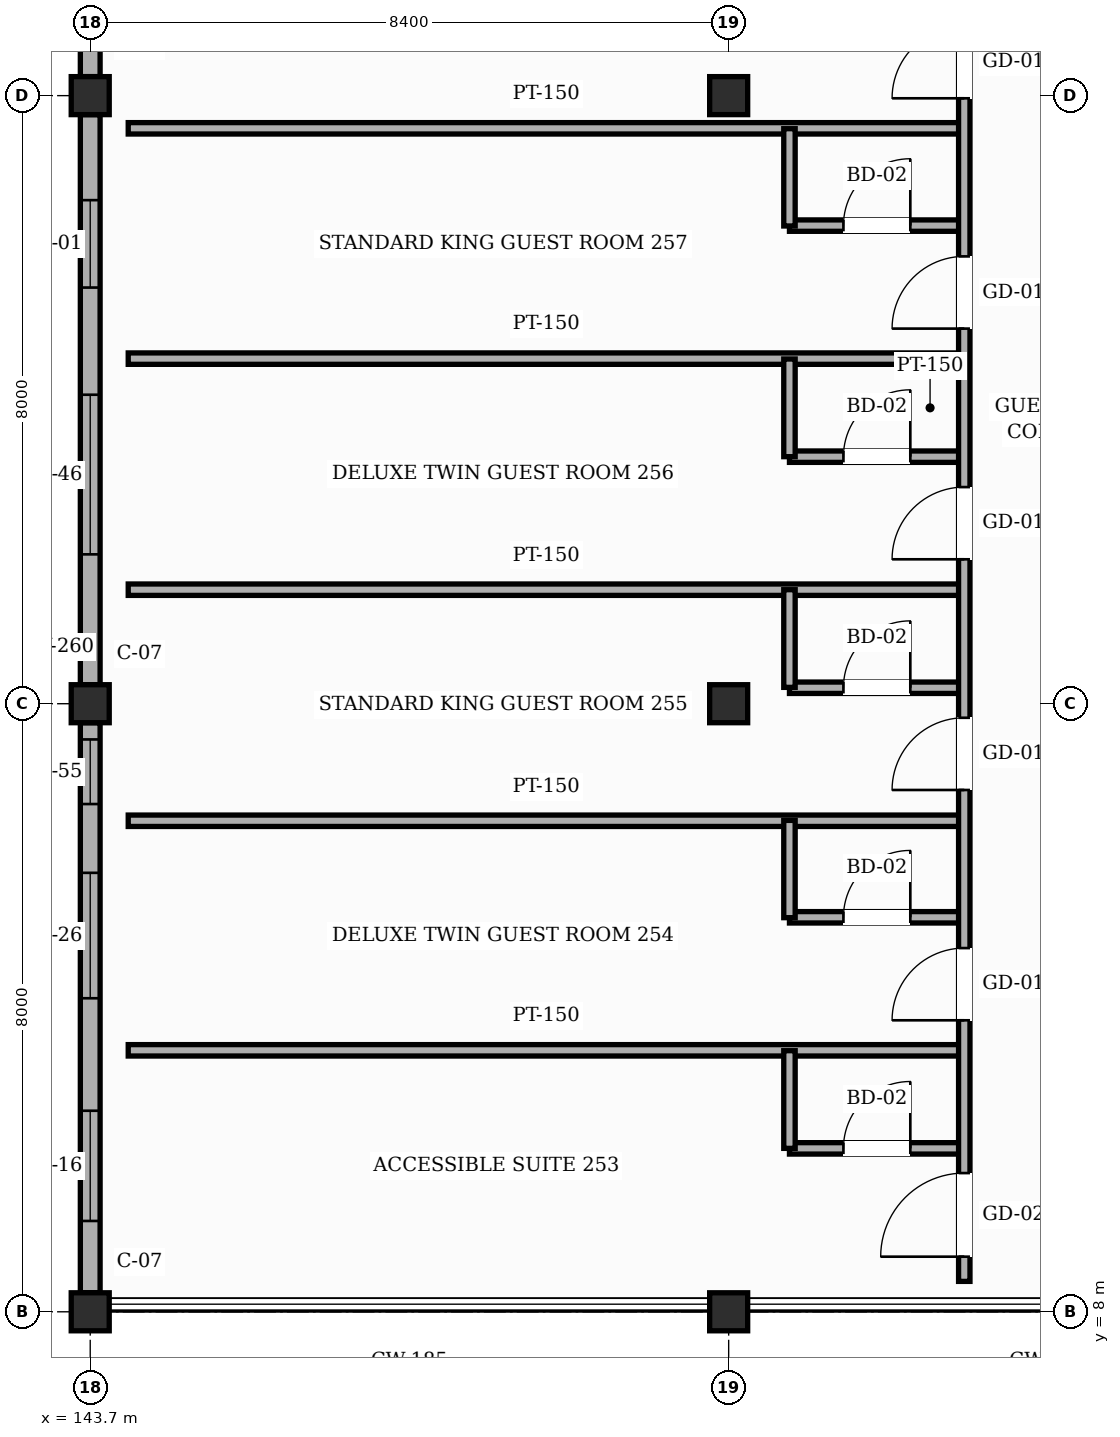
"""IFC4 building model, lengths in metres.
Left out: names, types, materials, properties, quantities, classifications, styles, units other than length and angle.
Written with IfcOpenShell. Run it as: python <this file> out.ifc"""

import sys

from ifc_helpers import new_model, si_unit, direction, frame, frame_2d, origin, origin_2d, place, context, subcontext, project, spatial, rectangle, hollow_rectangle, extrude, element, fill, save


model = new_model("IFC4")
c1 = context("Model", 3, precision=1e-05, world=origin(), true_north=direction((0.0, 1.0)))
c2 = subcontext(c1, "Body", "Model", "MODEL_VIEW")
j1 = project(units=[si_unit("LENGTHUNIT", "METRE"), si_unit("PLANEANGLEUNIT", "RADIAN")], contexts=[c1])
p1 = place(None, origin())
s1 = spatial("IfcSite", under=j1, at=p1, CompositionType="ELEMENT")
p2 = place(p1, origin())
s2 = spatial("IfcBuilding", under=s1, at=p2, CompositionType="ELEMENT")
p3 = place(p2, frame((0.0, 0.0, 39.0)))
s3 = spatial("IfcBuildingStorey", under=s2, at=p3, CompositionType="ELEMENT", Elevation=39.0)
p4 = place(p3, frame((143.7, 8.0, 0.0), z_axis=(0.0, 0.0, 1.0), x_axis=(1.0, 0.0, 0.0)))
e1 = element("IfcColumn", 1, at=p4, inside=s3, PredefinedType="COLUMN", context=c2, shape_type="SweptSolid", body=[
    extrude(hollow_rectangle(XDim=0.5, YDim=0.5, WallThickness=0.022, InnerFilletRadius=0.022, OuterFilletRadius=0.044, at=origin_2d()), origin(), (0.0, 0.0, 1.0), 3.38),
])
for number, where, z_axis, x_axis in (
    (2, (143.7, 16.0, 0.0), (0.0, 0.0, 1.0), (1.0, 0.0, 0.0)),
    (3, (143.7, 24.0, 0.0), (0.0, 0.0, 1.0), (1.0, 0.0, 0.0)),
):
    element("IfcColumn", number, at=place(p3, frame(where, z_axis=z_axis, x_axis=x_axis)), inside=s3, PredefinedType="COLUMN", context=c2, shape_type="SweptSolid", body=[
        extrude(hollow_rectangle(XDim=0.5, YDim=0.5, WallThickness=0.022, InnerFilletRadius=0.022, OuterFilletRadius=0.044, at=origin_2d()), origin(), (0.0, 0.0, 1.0), 3.6),
    ])
p5 = place(p3, frame((152.1, 8.0, 0.0), z_axis=(0.0, 0.0, 1.0), x_axis=(1.0, 0.0, 0.0)))
e4 = element("IfcColumn", 4, at=p5, inside=s3, PredefinedType="COLUMN", context=c2, shape_type="SweptSolid", body=[
    extrude(hollow_rectangle(XDim=0.5, YDim=0.5, WallThickness=0.022, InnerFilletRadius=0.022, OuterFilletRadius=0.044, at=origin_2d()), origin(), (0.0, 0.0, 1.0), 3.38),
])
for number, where, z_axis, x_axis in (
    (5, (152.1, 16.0, 0.0), (0.0, 0.0, 1.0), (1.0, 0.0, 0.0)),
    (6, (152.1, 24.0, 0.0), (0.0, 0.0, 1.0), (1.0, 0.0, 0.0)),
):
    element("IfcColumn", number, at=place(p3, frame(where, z_axis=z_axis, x_axis=x_axis)), inside=s3, PredefinedType="COLUMN", context=c2, shape_type="SweptSolid", body=[
        extrude(hollow_rectangle(XDim=0.5, YDim=0.5, WallThickness=0.022, InnerFilletRadius=0.022, OuterFilletRadius=0.044, at=origin_2d()), origin(), (0.0, 0.0, 1.0), 3.6),
    ])
p6 = place(p3, frame((143.7, 8.25, 0.0), z_axis=(0.0, 0.0, 1.0), x_axis=(0.0, 1.0, 0.0)))
e7 = element("IfcWall", 7, at=p6, inside=s3, PredefinedType="SOLIDWALL", context=c2, shape_type="SweptSolid", body=[
    extrude(rectangle(XDim=7.5, YDim=0.26, at=frame_2d((3.75, 0.0))), origin(), (0.0, 0.0, 1.0), 2.805),
])
p7 = place(p6, frame((0.945, 0.0, 0.85)))
e8 = element("IfcOpeningElement", 8, at=p7, cuts=e7, PredefinedType="OPENING", context=c2, shape_type="SweptSolid", body=[
    extrude(rectangle(XDim=1.45, YDim=1.35, at=frame_2d((0.725, 0.675))), frame((0.0, 0.14, 0.0), z_axis=(0.0, -1.0, 0.0), x_axis=(1.0, 0.0, 0.0)), (0.0, 0.0, 1.0), 0.28),
])
p8 = place(p6, frame((3.875, 0.0, 0.85)))
e9 = element("IfcOpeningElement", 9, at=p8, cuts=e7, PredefinedType="OPENING", context=c2, shape_type="SweptSolid", body=[
    extrude(rectangle(XDim=1.65, YDim=1.35, at=frame_2d((0.825, 0.675))), frame((0.0, 0.14, 0.0), z_axis=(0.0, -1.0, 0.0), x_axis=(1.0, 0.0, 0.0)), (0.0, 0.0, 1.0), 0.28),
])
p9 = place(p6, frame((6.43, 0.0, 0.85)))
e10 = element("IfcOpeningElement", 10, at=p9, cuts=e7, PredefinedType="OPENING", context=c2, shape_type="SweptSolid", body=[
    extrude(rectangle(XDim=0.85, YDim=1.35, at=frame_2d((0.425, 0.675))), frame((0.0, 0.14, 0.0), z_axis=(0.0, -1.0, 0.0), x_axis=(1.0, 0.0, 0.0)), (0.0, 0.0, 1.0), 0.28),
])
p10 = place(p3, frame((143.7, 16.25, 0.0), z_axis=(0.0, 0.0, 1.0), x_axis=(0.0, 1.0, 0.0)))
e11 = element("IfcWall", 11, at=p10, inside=s3, PredefinedType="SOLIDWALL", context=c2, shape_type="SweptSolid", body=[
    extrude(rectangle(XDim=7.5, YDim=0.26, at=frame_2d((3.75, 0.0))), origin(), (0.0, 0.0, 1.0), 2.805),
])
p11 = place(p10, frame((1.715, 0.0, 0.85)))
e12 = element("IfcOpeningElement", 12, at=p11, cuts=e11, PredefinedType="OPENING", context=c2, shape_type="SweptSolid", body=[
    extrude(rectangle(XDim=2.1, YDim=1.35, at=frame_2d((1.05, 0.675))), frame((0.0, 0.14, 0.0), z_axis=(0.0, -1.0, 0.0), x_axis=(1.0, 0.0, 0.0)), (0.0, 0.0, 1.0), 0.28),
])
p12 = place(p10, frame((5.225, 0.0, 0.85)))
e13 = element("IfcOpeningElement", 13, at=p12, cuts=e11, PredefinedType="OPENING", context=c2, shape_type="SweptSolid", body=[
    extrude(rectangle(XDim=1.15, YDim=1.35, at=frame_2d((0.575, 0.675))), frame((0.0, 0.14, 0.0), z_axis=(0.0, -1.0, 0.0), x_axis=(1.0, 0.0, 0.0)), (0.0, 0.0, 1.0), 0.28),
])
p13 = place(p3, frame((143.7, 24.25, 0.0), z_axis=(0.0, 0.0, 1.0), x_axis=(0.0, 1.0, 0.0)))
e14 = element("IfcWall", 14, at=p13, inside=s3, PredefinedType="SOLIDWALL", context=c2, shape_type="SweptSolid", body=[
    extrude(rectangle(XDim=2.35, YDim=0.26, at=frame_2d((1.175, 0.0))), origin(), (0.0, 0.0, 1.0), 2.805),
])
p14 = place(p13, frame((0.5, 0.0, 0.85)))
e15 = element("IfcOpeningElement", 15, at=p14, cuts=e14, PredefinedType="OPENING", context=c2, shape_type="SweptSolid", body=[
    extrude(rectangle(XDim=1.35, YDim=1.35, at=frame_2d((0.675, 0.675))), frame((0.0, 0.14, 0.0), z_axis=(0.0, -1.0, 0.0), x_axis=(1.0, 0.0, 0.0)), (0.0, 0.0, 1.0), 0.28),
])
p15 = place(p3, frame((152.9, 10.15, 0.0), z_axis=(0.0, 0.0, 1.0), x_axis=(1.0, 0.0, 0.0)))
e16 = element("IfcWall", 16, at=p15, inside=s3, PredefinedType="PARTITIONING", context=c2, shape_type="SweptSolid", body=[
    extrude(rectangle(XDim=2.3, YDim=0.15, at=frame_2d((1.15, 0.0))), origin(), (0.0, 0.0, 1.0), 3.365),
])
p16 = place(p15, frame((0.71, 0.0, 0.0)))
e17 = element("IfcOpeningElement", 17, at=p16, cuts=e16, PredefinedType="OPENING", context=c2, shape_type="SweptSolid", body=[
    extrude(rectangle(XDim=0.88, YDim=2.12, at=frame_2d((0.44, 1.06))), frame((0.0, 0.085, 0.0), z_axis=(0.0, -1.0, 0.0), x_axis=(1.0, 0.0, 0.0)), (0.0, 0.0, 1.0), 0.17),
])
p17 = place(p3, frame((144.2, 11.44, 0.0), z_axis=(0.0, 0.0, 1.0), x_axis=(1.0, 0.0, 0.0)))
e18 = element("IfcWall", 18, at=p17, inside=s3, PredefinedType="PARTITIONING", context=c2, shape_type="SweptSolid", body=[
    extrude(rectangle(XDim=11.0, YDim=0.15, at=frame_2d((5.5, 0.0))), origin(), (0.0, 0.0, 1.0), 3.365),
])
p18 = place(p3, frame((152.9, 13.19, 0.0), z_axis=(0.0, 0.0, 1.0), x_axis=(1.0, 0.0, 0.0)))
e19 = element("IfcWall", 19, at=p18, inside=s3, PredefinedType="PARTITIONING", context=c2, shape_type="SweptSolid", body=[
    extrude(rectangle(XDim=2.3, YDim=0.15, at=frame_2d((1.15, 0.0))), origin(), (0.0, 0.0, 1.0), 3.365),
])
p19 = place(p18, frame((0.71, 0.0, 0.0)))
e20 = element("IfcOpeningElement", 20, at=p19, cuts=e19, PredefinedType="OPENING", context=c2, shape_type="SweptSolid", body=[
    extrude(rectangle(XDim=0.88, YDim=2.12, at=frame_2d((0.44, 1.06))), frame((0.0, 0.085, 0.0), z_axis=(0.0, -1.0, 0.0), x_axis=(1.0, 0.0, 0.0)), (0.0, 0.0, 1.0), 0.17),
])
p20 = place(p3, frame((144.2, 14.46, 0.0), z_axis=(0.0, 0.0, 1.0), x_axis=(1.0, 0.0, 0.0)))
e21 = element("IfcWall", 21, at=p20, inside=s3, PredefinedType="PARTITIONING", context=c2, shape_type="SweptSolid", body=[
    extrude(rectangle(XDim=11.0, YDim=0.15, at=frame_2d((5.5, 0.0))), origin(), (0.0, 0.0, 1.0), 3.365),
])
p21 = place(p3, frame((152.9, 16.21, 0.0), z_axis=(0.0, 0.0, 1.0), x_axis=(1.0, 0.0, 0.0)))
e22 = element("IfcWall", 22, at=p21, inside=s3, PredefinedType="PARTITIONING", context=c2, shape_type="SweptSolid", body=[
    extrude(rectangle(XDim=2.3, YDim=0.15, at=frame_2d((1.15, 0.0))), origin(), (0.0, 0.0, 1.0), 2.755),
])
p22 = place(p21, frame((0.71, 0.0, 0.0)))
e23 = element("IfcOpeningElement", 23, at=p22, cuts=e22, PredefinedType="OPENING", context=c2, shape_type="SweptSolid", body=[
    extrude(rectangle(XDim=0.88, YDim=2.12, at=frame_2d((0.44, 1.06))), frame((0.0, 0.085, 0.0), z_axis=(0.0, -1.0, 0.0), x_axis=(1.0, 0.0, 0.0)), (0.0, 0.0, 1.0), 0.17),
])
p23 = place(p3, frame((144.2, 17.5, 0.0), z_axis=(0.0, 0.0, 1.0), x_axis=(1.0, 0.0, 0.0)))
e24 = element("IfcWall", 24, at=p23, inside=s3, PredefinedType="PARTITIONING", context=c2, shape_type="SweptSolid", body=[
    extrude(rectangle(XDim=11.0, YDim=0.15, at=frame_2d((5.5, 0.0))), origin(), (0.0, 0.0, 1.0), 3.365),
])
p24 = place(p3, frame((152.9, 19.25, 0.0), z_axis=(0.0, 0.0, 1.0), x_axis=(1.0, 0.0, 0.0)))
e25 = element("IfcWall", 25, at=p24, inside=s3, PredefinedType="PARTITIONING", context=c2, shape_type="SweptSolid", body=[
    extrude(rectangle(XDim=2.3, YDim=0.15, at=frame_2d((1.15, 0.0))), origin(), (0.0, 0.0, 1.0), 3.365),
])
p25 = place(p24, frame((0.71, 0.0, 0.0)))
e26 = element("IfcOpeningElement", 26, at=p25, cuts=e25, PredefinedType="OPENING", context=c2, shape_type="SweptSolid", body=[
    extrude(rectangle(XDim=0.88, YDim=2.12, at=frame_2d((0.44, 1.06))), frame((0.0, 0.085, 0.0), z_axis=(0.0, -1.0, 0.0), x_axis=(1.0, 0.0, 0.0)), (0.0, 0.0, 1.0), 0.17),
])
p26 = place(p3, frame((144.2, 20.54, 0.0), z_axis=(0.0, 0.0, 1.0), x_axis=(1.0, 0.0, 0.0)))
e27 = element("IfcWall", 27, at=p26, inside=s3, PredefinedType="PARTITIONING", context=c2, shape_type="SweptSolid", body=[
    extrude(rectangle(XDim=11.0, YDim=0.15, at=frame_2d((5.5, 0.0))), origin(), (0.0, 0.0, 1.0), 3.365),
])
p27 = place(p3, frame((152.9, 22.29, 0.0), z_axis=(0.0, 0.0, 1.0), x_axis=(1.0, 0.0, 0.0)))
e28 = element("IfcWall", 28, at=p27, inside=s3, PredefinedType="PARTITIONING", context=c2, shape_type="SweptSolid", body=[
    extrude(rectangle(XDim=2.3, YDim=0.15, at=frame_2d((1.15, 0.0))), origin(), (0.0, 0.0, 1.0), 3.365),
])
p28 = place(p27, frame((0.71, 0.0, 0.0)))
e29 = element("IfcOpeningElement", 29, at=p28, cuts=e28, PredefinedType="OPENING", context=c2, shape_type="SweptSolid", body=[
    extrude(rectangle(XDim=0.88, YDim=2.12, at=frame_2d((0.44, 1.06))), frame((0.0, 0.085, 0.0), z_axis=(0.0, -1.0, 0.0), x_axis=(1.0, 0.0, 0.0)), (0.0, 0.0, 1.0), 0.17),
])
p29 = place(p3, frame((144.2, 23.57, 0.0), z_axis=(0.0, 0.0, 1.0), x_axis=(1.0, 0.0, 0.0)))
e30 = element("IfcWall", 30, at=p29, inside=s3, PredefinedType="PARTITIONING", context=c2, shape_type="SweptSolid", body=[
    extrude(rectangle(XDim=11.0, YDim=0.15, at=frame_2d((5.5, 0.0))), origin(), (0.0, 0.0, 1.0), 3.365),
])
p30 = place(p3, frame((152.9, 10.15, 0.0), z_axis=(0.0, 0.0, 1.0), x_axis=(0.0, 1.0, 0.0)))
e31 = element("IfcWall", 31, at=p30, inside=s3, PredefinedType="PARTITIONING", context=c2, shape_type="SweptSolid", body=[
    extrude(rectangle(XDim=1.285, YDim=0.15, at=frame_2d((0.643, 0.0))), origin(), (0.0, 0.0, 1.0), 3.365),
])
p31 = place(p3, frame((152.9, 13.185, 0.0), z_axis=(0.0, 0.0, 1.0), x_axis=(0.0, 1.0, 0.0)))
e32 = element("IfcWall", 32, at=p31, inside=s3, PredefinedType="PARTITIONING", context=c2, shape_type="SweptSolid", body=[
    extrude(rectangle(XDim=1.28, YDim=0.15, at=frame_2d((0.64, 0.0))), origin(), (0.0, 0.0, 1.0), 3.365),
])
for number, where, z_axis, x_axis in (
    (33, (152.9, 16.215, 0.0), (0.0, 0.0, 1.0), (0.0, 1.0, 0.0)),
    (34, (152.9, 19.25, 0.0), (0.0, 0.0, 1.0), (0.0, 1.0, 0.0)),
):
    element("IfcWall", number, at=place(p3, frame(where, z_axis=z_axis, x_axis=x_axis)), inside=s3, PredefinedType="PARTITIONING", context=c2, shape_type="SweptSolid", body=[
        extrude(rectangle(XDim=1.285, YDim=0.15, at=frame_2d((0.643, 0.0))), origin(), (0.0, 0.0, 1.0), 3.365),
    ])
p32 = place(p3, frame((152.9, 22.285, 0.0), z_axis=(0.0, 0.0, 1.0), x_axis=(0.0, 1.0, 0.0)))
e35 = element("IfcWall", 35, at=p32, inside=s3, PredefinedType="PARTITIONING", context=c2, shape_type="SweptSolid", body=[
    extrude(rectangle(XDim=1.28, YDim=0.15, at=frame_2d((0.64, 0.0))), origin(), (0.0, 0.0, 1.0), 3.365),
])
p33 = place(p3, frame((155.2, 8.4, 0.0), z_axis=(0.0, 0.0, 1.0), x_axis=(0.0, 1.0, 0.0)))
e36 = element("IfcWall", 36, at=p33, inside=s3, PredefinedType="PARTITIONING", context=c2, shape_type="SweptSolid", body=[
    extrude(rectangle(XDim=18.2, YDim=0.15, at=frame_2d((9.1, 0.0))), origin(), (0.0, 0.0, 1.0), 3.365),
])
p34 = place(p33, frame((0.325, 0.0, 0.0)))
e37 = element("IfcOpeningElement", 37, at=p34, cuts=e36, PredefinedType="OPENING", context=c2, shape_type="SweptSolid", body=[
    extrude(rectangle(XDim=1.1, YDim=2.2, at=frame_2d((0.55, 1.1))), frame((0.0, 0.085, 0.0), z_axis=(0.0, -1.0, 0.0), x_axis=(1.0, 0.0, 0.0)), (0.0, 0.0, 1.0), 0.17),
])
p35 = place(p33, frame((3.435, 0.0, 0.0)))
e38 = element("IfcOpeningElement", 38, at=p35, cuts=e36, PredefinedType="OPENING", context=c2, shape_type="SweptSolid", body=[
    extrude(rectangle(XDim=0.95, YDim=2.15, at=frame_2d((0.475, 1.075))), frame((0.0, 0.085, 0.0), z_axis=(0.0, -1.0, 0.0), x_axis=(1.0, 0.0, 0.0)), (0.0, 0.0, 1.0), 0.17),
])
p36 = place(p33, frame((6.465, 0.0, 0.0)))
e39 = element("IfcOpeningElement", 39, at=p36, cuts=e36, PredefinedType="OPENING", context=c2, shape_type="SweptSolid", body=[
    extrude(rectangle(XDim=0.95, YDim=2.15, at=frame_2d((0.475, 1.075))), frame((0.0, 0.085, 0.0), z_axis=(0.0, -1.0, 0.0), x_axis=(1.0, 0.0, 0.0)), (0.0, 0.0, 1.0), 0.17),
])
p37 = place(p33, frame((9.5, 0.0, 0.0)))
e40 = element("IfcOpeningElement", 40, at=p37, cuts=e36, PredefinedType="OPENING", context=c2, shape_type="SweptSolid", body=[
    extrude(rectangle(XDim=0.95, YDim=2.15, at=frame_2d((0.475, 1.075))), frame((0.0, 0.085, 0.0), z_axis=(0.0, -1.0, 0.0), x_axis=(1.0, 0.0, 0.0)), (0.0, 0.0, 1.0), 0.17),
])
p38 = place(p33, frame((12.535, 0.0, 0.0)))
e41 = element("IfcOpeningElement", 41, at=p38, cuts=e36, PredefinedType="OPENING", context=c2, shape_type="SweptSolid", body=[
    extrude(rectangle(XDim=0.95, YDim=2.15, at=frame_2d((0.475, 1.075))), frame((0.0, 0.085, 0.0), z_axis=(0.0, -1.0, 0.0), x_axis=(1.0, 0.0, 0.0)), (0.0, 0.0, 1.0), 0.17),
])
p39 = place(p33, frame((15.565, 0.0, 0.0)))
e42 = element("IfcOpeningElement", 42, at=p39, cuts=e36, PredefinedType="OPENING", context=c2, shape_type="SweptSolid", body=[
    extrude(rectangle(XDim=0.95, YDim=2.15, at=frame_2d((0.475, 1.075))), frame((0.0, 0.085, 0.0), z_axis=(0.0, -1.0, 0.0), x_axis=(1.0, 0.0, 0.0)), (0.0, 0.0, 1.0), 0.17),
])
p40 = place(p7, origin())
e43 = element("IfcWindow", 43, at=p40, inside=s3, PartitioningType="SINGLE_PANEL", PredefinedType="WINDOW", context=c2, shape_type="SweptSolid", body=[
    extrude(rectangle(XDim=1.45, YDim=1.35, at=frame_2d((0.725, 0.675))), frame((0.0, 0.03, 0.0), z_axis=(0.0, -1.0, 0.0), x_axis=(1.0, 0.0, 0.0)), (0.0, 0.0, 1.0), 0.06),
])
fill(e8, e43)
p41 = place(p8, origin())
e44 = element("IfcWindow", 44, at=p41, inside=s3, PartitioningType="SINGLE_PANEL", PredefinedType="WINDOW", context=c2, shape_type="SweptSolid", body=[
    extrude(rectangle(XDim=1.65, YDim=1.35, at=frame_2d((0.825, 0.675))), frame((0.0, 0.03, 0.0), z_axis=(0.0, -1.0, 0.0), x_axis=(1.0, 0.0, 0.0)), (0.0, 0.0, 1.0), 0.06),
])
fill(e9, e44)
p42 = place(p9, origin())
e45 = element("IfcWindow", 45, at=p42, inside=s3, PartitioningType="SINGLE_PANEL", PredefinedType="WINDOW", context=c2, shape_type="SweptSolid", body=[
    extrude(rectangle(XDim=0.85, YDim=1.35, at=frame_2d((0.425, 0.675))), frame((0.0, 0.03, 0.0), z_axis=(0.0, -1.0, 0.0), x_axis=(1.0, 0.0, 0.0)), (0.0, 0.0, 1.0), 0.06),
])
fill(e10, e45)
p43 = place(p11, origin())
e46 = element("IfcWindow", 46, at=p43, inside=s3, PartitioningType="SINGLE_PANEL", PredefinedType="WINDOW", context=c2, shape_type="SweptSolid", body=[
    extrude(rectangle(XDim=2.1, YDim=1.35, at=frame_2d((1.05, 0.675))), frame((0.0, 0.03, 0.0), z_axis=(0.0, -1.0, 0.0), x_axis=(1.0, 0.0, 0.0)), (0.0, 0.0, 1.0), 0.06),
])
fill(e12, e46)
p44 = place(p12, origin())
e47 = element("IfcWindow", 47, at=p44, inside=s3, PartitioningType="SINGLE_PANEL", PredefinedType="WINDOW", context=c2, shape_type="SweptSolid", body=[
    extrude(rectangle(XDim=1.15, YDim=1.35, at=frame_2d((0.575, 0.675))), frame((0.0, 0.03, 0.0), z_axis=(0.0, -1.0, 0.0), x_axis=(1.0, 0.0, 0.0)), (0.0, 0.0, 1.0), 0.06),
])
fill(e13, e47)
p45 = place(p34, origin())
e48 = element("IfcDoor", 48, at=p45, inside=s3, OperationType="SINGLE_SWING_LEFT", PredefinedType="DOOR", context=c2, shape_type="SweptSolid", body=[
    extrude(rectangle(XDim=1.1, YDim=2.2, at=frame_2d((0.55, 1.1))), frame((0.0, 0.025, 0.0), z_axis=(0.0, -1.0, 0.0), x_axis=(1.0, 0.0, 0.0)), (0.0, 0.0, 1.0), 0.05),
])
fill(e37, e48)
p46 = place(p16, origin())
e49 = element("IfcDoor", 49, at=p46, inside=s3, OperationType="SINGLE_SWING_RIGHT", PredefinedType="DOOR", context=c2, shape_type="SweptSolid", body=[
    extrude(rectangle(XDim=0.88, YDim=2.12, at=frame_2d((0.44, 1.06))), frame((0.0, 0.025, 0.0), z_axis=(0.0, -1.0, 0.0), x_axis=(1.0, 0.0, 0.0)), (0.0, 0.0, 1.0), 0.05),
])
fill(e17, e49)
p47 = place(p35, origin())
e50 = element("IfcDoor", 50, at=p47, inside=s3, OperationType="SINGLE_SWING_LEFT", PredefinedType="DOOR", context=c2, shape_type="SweptSolid", body=[
    extrude(rectangle(XDim=0.95, YDim=2.15, at=frame_2d((0.475, 1.075))), frame((0.0, 0.025, 0.0), z_axis=(0.0, -1.0, 0.0), x_axis=(1.0, 0.0, 0.0)), (0.0, 0.0, 1.0), 0.05),
])
fill(e38, e50)
p48 = place(p19, origin())
e51 = element("IfcDoor", 51, at=p48, inside=s3, OperationType="SINGLE_SWING_RIGHT", PredefinedType="DOOR", context=c2, shape_type="SweptSolid", body=[
    extrude(rectangle(XDim=0.88, YDim=2.12, at=frame_2d((0.44, 1.06))), frame((0.0, 0.025, 0.0), z_axis=(0.0, -1.0, 0.0), x_axis=(1.0, 0.0, 0.0)), (0.0, 0.0, 1.0), 0.05),
])
fill(e20, e51)
p49 = place(p36, origin())
e52 = element("IfcDoor", 52, at=p49, inside=s3, OperationType="SINGLE_SWING_LEFT", PredefinedType="DOOR", context=c2, shape_type="SweptSolid", body=[
    extrude(rectangle(XDim=0.95, YDim=2.15, at=frame_2d((0.475, 1.075))), frame((0.0, 0.025, 0.0), z_axis=(0.0, -1.0, 0.0), x_axis=(1.0, 0.0, 0.0)), (0.0, 0.0, 1.0), 0.05),
])
fill(e39, e52)
p50 = place(p22, origin())
e53 = element("IfcDoor", 53, at=p50, inside=s3, OperationType="SINGLE_SWING_RIGHT", PredefinedType="DOOR", context=c2, shape_type="SweptSolid", body=[
    extrude(rectangle(XDim=0.88, YDim=2.12, at=frame_2d((0.44, 1.06))), frame((0.0, 0.025, 0.0), z_axis=(0.0, -1.0, 0.0), x_axis=(1.0, 0.0, 0.0)), (0.0, 0.0, 1.0), 0.05),
])
fill(e23, e53)
p51 = place(p37, origin())
e54 = element("IfcDoor", 54, at=p51, inside=s3, OperationType="SINGLE_SWING_LEFT", PredefinedType="DOOR", context=c2, shape_type="SweptSolid", body=[
    extrude(rectangle(XDim=0.95, YDim=2.15, at=frame_2d((0.475, 1.075))), frame((0.0, 0.025, 0.0), z_axis=(0.0, -1.0, 0.0), x_axis=(1.0, 0.0, 0.0)), (0.0, 0.0, 1.0), 0.05),
])
fill(e40, e54)
p52 = place(p25, origin())
e55 = element("IfcDoor", 55, at=p52, inside=s3, OperationType="SINGLE_SWING_RIGHT", PredefinedType="DOOR", context=c2, shape_type="SweptSolid", body=[
    extrude(rectangle(XDim=0.88, YDim=2.12, at=frame_2d((0.44, 1.06))), frame((0.0, 0.025, 0.0), z_axis=(0.0, -1.0, 0.0), x_axis=(1.0, 0.0, 0.0)), (0.0, 0.0, 1.0), 0.05),
])
fill(e26, e55)
p53 = place(p38, origin())
e56 = element("IfcDoor", 56, at=p53, inside=s3, OperationType="SINGLE_SWING_LEFT", PredefinedType="DOOR", context=c2, shape_type="SweptSolid", body=[
    extrude(rectangle(XDim=0.95, YDim=2.15, at=frame_2d((0.475, 1.075))), frame((0.0, 0.025, 0.0), z_axis=(0.0, -1.0, 0.0), x_axis=(1.0, 0.0, 0.0)), (0.0, 0.0, 1.0), 0.05),
])
fill(e41, e56)
p54 = place(p28, origin())
e57 = element("IfcDoor", 57, at=p54, inside=s3, OperationType="SINGLE_SWING_RIGHT", PredefinedType="DOOR", context=c2, shape_type="SweptSolid", body=[
    extrude(rectangle(XDim=0.88, YDim=2.12, at=frame_2d((0.44, 1.06))), frame((0.0, 0.025, 0.0), z_axis=(0.0, -1.0, 0.0), x_axis=(1.0, 0.0, 0.0)), (0.0, 0.0, 1.0), 0.05),
])
fill(e29, e57)
p55 = place(p39, origin())
e58 = element("IfcDoor", 58, at=p55, inside=s3, OperationType="SINGLE_SWING_LEFT", PredefinedType="DOOR", context=c2, shape_type="SweptSolid", body=[
    extrude(rectangle(XDim=0.95, YDim=2.15, at=frame_2d((0.475, 1.075))), frame((0.0, 0.025, 0.0), z_axis=(0.0, -1.0, 0.0), x_axis=(1.0, 0.0, 0.0)), (0.0, 0.0, 1.0), 0.05),
])
fill(e42, e58)
save(model, sys.argv[1])
